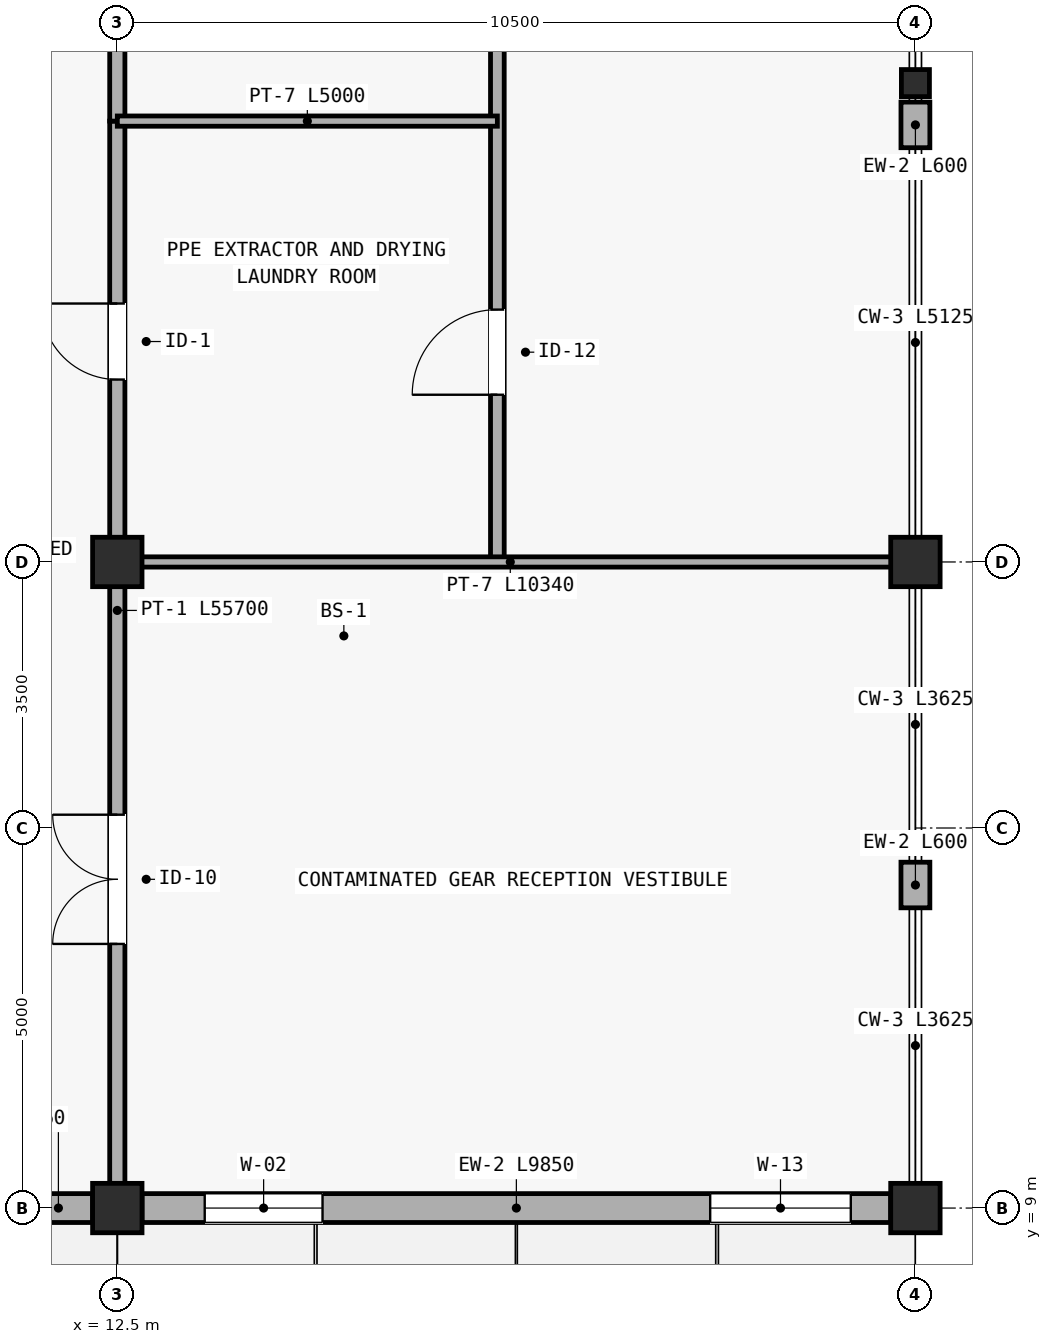
"""IFC4 building model, lengths in metres.
Left out: names, types, materials, properties, quantities, classifications, styles, units other than length and angle.
Written with IfcOpenShell. Run it as: python <this file> out.ifc"""

import sys

from ifc_helpers import new_model, si_unit, direction, frame, frame_2d, origin, origin_2d, place, context, subcontext, project, spatial, rectangle, i_section, extrude, element, fill, save


model = new_model("IFC4")
c1 = context("Model", 3, precision=1e-05, world=origin(), true_north=direction((0.0, 1.0)))
c2 = subcontext(c1, "Body", "Model", "MODEL_VIEW")
j1 = project(units=[si_unit("LENGTHUNIT", "METRE"), si_unit("PLANEANGLEUNIT", "RADIAN")], contexts=[c1])
p1 = place(None, origin())
s1 = spatial("IfcSite", under=j1, at=p1, CompositionType="ELEMENT")
p2 = place(p1, origin())
s2 = spatial("IfcBuilding", under=s1, at=p2, CompositionType="ELEMENT")
p3 = place(p2, origin())
s3 = spatial("IfcBuildingStorey", under=s2, at=p3, CompositionType="ELEMENT", Elevation=0.0)
for number, where, z_axis, x_axis in (
    (1, (12.5, 9.0, 0.0), (0.0, 0.0, 1.0), (1.0, 0.0, 0.0)),
    (2, (12.5, 17.5, 0.0), (0.0, 0.0, 1.0), (1.0, 0.0, 0.0)),
    (3, (23.0, 9.0, 0.0), (0.0, 0.0, 1.0), (1.0, 0.0, 0.0)),
    (4, (23.0, 17.5, 0.0), (0.0, 0.0, 1.0), (1.0, 0.0, 0.0)),
):
    element("IfcColumn", number, at=place(p3, frame(where, z_axis=z_axis, x_axis=x_axis)), inside=s3, PredefinedType="COLUMN", context=c2, shape_type="SweptSolid", body=[
        extrude(rectangle(XDim=0.65, YDim=0.65, at=origin_2d()), origin(), (0.0, 0.0, 1.0), 5.85),
    ])
p4 = place(p3, frame((23.0, 23.8, 0.0), z_axis=(0.0, 0.0, 1.0), x_axis=(1.0, 0.0, 0.0)))
e5 = element("IfcColumn", 5, at=p4, inside=s3, PredefinedType="COLUMN", context=c2, shape_type="SweptSolid", body=[
    extrude(i_section(OverallWidth=0.369, OverallDepth=0.356, WebThickness=0.011, FlangeThickness=0.018, FilletRadius=0.015, at=origin_2d()), origin(), (0.0, 0.0, 1.0), 5.85),
])
p5 = place(p3, frame((8.825, 9.0, 0.0), z_axis=(0.0, 0.0, 1.0), x_axis=(1.0, 0.0, 0.0)))
e6 = element("IfcWall", 6, at=p5, inside=s3, PredefinedType="STANDARD", context=c2, shape_type="SweptSolid", body=[
    extrude(rectangle(XDim=3.35, YDim=0.38, at=frame_2d((1.675, 0.0))), origin(), (0.0, 0.0, 1.0), 5.05),
])
p6 = place(p5, frame((0.625, 0.0, 0.0)))
e7 = element("IfcOpeningElement", 7, at=p6, cuts=e6, PredefinedType="OPENING", context=c2, shape_type="SweptSolid", body=[
    extrude(rectangle(XDim=1.95, YDim=2.3, at=frame_2d((0.975, 1.15))), frame((0.0, 0.2, 0.0), z_axis=(0.0, -1.0, 0.0), x_axis=(1.0, 0.0, 0.0)), (0.0, 0.0, 1.0), 0.4),
])
p7 = place(p3, frame((12.825, 9.0, 0.0), z_axis=(0.0, 0.0, 1.0), x_axis=(1.0, 0.0, 0.0)))
e8 = element("IfcWall", 8, at=p7, inside=s3, PredefinedType="STANDARD", context=c2, shape_type="SweptSolid", body=[
    extrude(rectangle(XDim=9.85, YDim=0.38, at=frame_2d((4.925, 0.0))), origin(), (0.0, 0.0, 1.0), 5.05),
])
p8 = place(p7, frame((0.825, 0.0, 0.75)))
e9 = element("IfcOpeningElement", 9, at=p8, cuts=e8, PredefinedType="OPENING", context=c2, shape_type="SweptSolid", body=[
    extrude(rectangle(XDim=1.55, YDim=1.55, at=frame_2d((0.775, 0.775))), frame((0.0, 0.2, 0.0), z_axis=(0.0, -1.0, 0.0), x_axis=(1.0, 0.0, 0.0)), (0.0, 0.0, 1.0), 0.4),
])
p9 = place(p7, frame((7.475, 0.0, 0.75)))
e10 = element("IfcOpeningElement", 10, at=p9, cuts=e8, PredefinedType="OPENING", context=c2, shape_type="SweptSolid", body=[
    extrude(rectangle(XDim=1.85, YDim=1.3, at=frame_2d((0.925, 0.65))), frame((0.0, 0.2, 0.0), z_axis=(0.0, -1.0, 0.0), x_axis=(1.0, 0.0, 0.0)), (0.0, 0.0, 1.0), 0.4),
])
for number, where, z_axis, x_axis in (
    (11, (23.0, 12.95, 0.0), (0.0, 0.0, 1.0), (0.0, 1.0, 0.0)),
    (12, (23.0, 22.95, 0.0), (0.0, 0.0, 1.0), (0.0, 1.0, 0.0)),
):
    element("IfcWall", number, at=place(p3, frame(where, z_axis=z_axis, x_axis=x_axis)), inside=s3, PredefinedType="STANDARD", context=c2, shape_type="SweptSolid", body=[
        extrude(rectangle(XDim=0.6, YDim=0.38, at=frame_2d((0.3, 0.0))), origin(), (0.0, 0.0, 1.0), 5.05),
    ])
p10 = place(p3, frame((17.5, 17.5, 0.0), z_axis=(0.0, 0.0, 1.0), x_axis=(0.0, 1.0, 0.0)))
e13 = element("IfcWall", 13, at=p10, inside=s3, PredefinedType="PARTITIONING", context=c2, shape_type="SweptSolid", body=[
    extrude(rectangle(XDim=11.5, YDim=0.18, at=frame_2d((5.75, 0.0))), origin(), (0.0, 0.0, 1.0), 5.0),
])
p11 = place(p10, frame((2.2, 0.0, 0.0)))
e14 = element("IfcOpeningElement", 14, at=p11, cuts=e13, PredefinedType="OPENING", context=c2, shape_type="SweptSolid", body=[
    extrude(rectangle(XDim=1.12, YDim=2.15, at=frame_2d((0.56, 1.075))), frame((0.0, 0.1, 0.0), z_axis=(0.0, -1.0, 0.0), x_axis=(1.0, 0.0, 0.0)), (0.0, 0.0, 1.0), 0.2),
])
p12 = place(p3, frame((12.5, 9.15, 0.0), z_axis=(0.0, 0.0, 1.0), x_axis=(0.0, 1.0, 0.0)))
e15 = element("IfcWall", 15, at=p12, inside=s3, PredefinedType="PARTITIONING", context=c2, shape_type="SweptSolid", body=[
    extrude(rectangle(XDim=8.35, YDim=0.2, at=frame_2d((4.175, 0.0))), origin(), (0.0, 0.0, 1.0), 5.0),
])
p13 = place(p12, frame((3.325, 0.0, 0.0)))
e16 = element("IfcOpeningElement", 16, at=p13, cuts=e15, PredefinedType="OPENING", context=c2, shape_type="SweptSolid", body=[
    extrude(rectangle(XDim=1.7, YDim=2.16, at=frame_2d((0.85, 1.08))), frame((0.0, 0.11, 0.0), z_axis=(0.0, -1.0, 0.0), x_axis=(1.0, 0.0, 0.0)), (0.0, 0.0, 1.0), 0.22),
])
p14 = place(p3, frame((12.5, 17.5, 0.0), z_axis=(0.0, 0.0, 1.0), x_axis=(0.0, 1.0, 0.0)))
e17 = element("IfcWall", 17, at=p14, inside=s3, PredefinedType="PARTITIONING", context=c2, shape_type="SweptSolid", body=[
    extrude(rectangle(XDim=5.8, YDim=0.2, at=frame_2d((2.9, 0.0))), origin(), (0.0, 0.0, 1.0), 5.0),
])
p15 = place(p14, frame((2.4, 0.0, 0.0)))
e18 = element("IfcOpeningElement", 18, at=p15, cuts=e17, PredefinedType="OPENING", context=c2, shape_type="SweptSolid", body=[
    extrude(rectangle(XDim=1.0, YDim=2.12, at=frame_2d((0.5, 1.06))), frame((0.0, 0.11, 0.0), z_axis=(0.0, -1.0, 0.0), x_axis=(1.0, 0.0, 0.0)), (0.0, 0.0, 1.0), 0.22),
])
p16 = place(p3, frame((12.5, 23.3, 0.0), z_axis=(0.0, 0.0, 1.0), x_axis=(0.0, 1.0, 0.0)))
e19 = element("IfcWall", 19, at=p16, inside=s3, PredefinedType="PARTITIONING", context=c2, shape_type="SweptSolid", body=[
    extrude(rectangle(XDim=5.7, YDim=0.2, at=frame_2d((2.85, 0.0))), origin(), (0.0, 0.0, 1.0), 5.0),
])
p17 = place(p16, frame((2.36, 0.0, 0.0)))
e20 = element("IfcOpeningElement", 20, at=p17, cuts=e19, PredefinedType="OPENING", context=c2, shape_type="SweptSolid", body=[
    extrude(rectangle(XDim=0.98, YDim=2.12, at=frame_2d((0.49, 1.06))), frame((0.0, 0.11, 0.0), z_axis=(0.0, -1.0, 0.0), x_axis=(1.0, 0.0, 0.0)), (0.0, 0.0, 1.0), 0.22),
])
p18 = place(p3, frame((12.5, 17.5, 0.0), z_axis=(0.0, 0.0, 1.0), x_axis=(1.0, 0.0, 0.0)))
e21 = element("IfcWall", 21, at=p18, inside=s3, PredefinedType="PARTITIONING", context=c2, shape_type="SweptSolid", body=[
    extrude(rectangle(XDim=10.34, YDim=0.135, at=frame_2d((5.17, 0.0))), origin(), (0.0, 0.0, 1.0), 5.0),
])
p19 = place(p3, frame((12.5, 23.3, 0.0), z_axis=(0.0, 0.0, 1.0), x_axis=(1.0, 0.0, 0.0)))
e22 = element("IfcWall", 22, at=p19, inside=s3, PredefinedType="PARTITIONING", context=c2, shape_type="SweptSolid", body=[
    extrude(rectangle(XDim=5.0, YDim=0.135, at=frame_2d((2.5, 0.0))), origin(), (0.0, 0.0, 1.0), 5.0),
])
p20 = place(p8, origin())
e23 = element("IfcWindow", 23, at=p20, inside=s3, PartitioningType="DOUBLE_PANEL_VERTICAL", PredefinedType="WINDOW", context=c2, shape_type="SweptSolid", body=[
    extrude(rectangle(XDim=1.55, YDim=1.55, at=frame_2d((0.775, 0.775))), frame((0.0, 0.03, 0.0), z_axis=(0.0, -1.0, 0.0), x_axis=(1.0, 0.0, 0.0)), (0.0, 0.0, 1.0), 0.06),
])
fill(e9, e23)
p21 = place(p9, origin())
e24 = element("IfcWindow", 24, at=p21, inside=s3, PartitioningType="DOUBLE_PANEL_HORIZONTAL", PredefinedType="WINDOW", context=c2, shape_type="SweptSolid", body=[
    extrude(rectangle(XDim=1.85, YDim=1.3, at=frame_2d((0.925, 0.65))), frame((0.0, 0.03, 0.0), z_axis=(0.0, -1.0, 0.0), x_axis=(1.0, 0.0, 0.0)), (0.0, 0.0, 1.0), 0.06),
])
fill(e10, e24)
p22 = place(p11, origin())
e25 = element("IfcDoor", 25, at=p22, inside=s3, OperationType="SINGLE_SWING_LEFT", PredefinedType="DOOR", context=c2, shape_type="SweptSolid", body=[
    extrude(rectangle(XDim=1.12, YDim=2.15, at=frame_2d((0.56, 1.075))), frame((0.0, 0.025, 0.0), z_axis=(0.0, -1.0, 0.0), x_axis=(1.0, 0.0, 0.0)), (0.0, 0.0, 1.0), 0.05),
])
fill(e14, e25)
p23 = place(p13, origin())
e26 = element("IfcDoor", 26, at=p23, inside=s3, OperationType="DOUBLE_DOOR_SINGLE_SWING", PredefinedType="DOOR", context=c2, shape_type="SweptSolid", body=[
    extrude(rectangle(XDim=1.7, YDim=2.16, at=frame_2d((0.85, 1.08))), frame((0.0, 0.025, 0.0), z_axis=(0.0, -1.0, 0.0), x_axis=(1.0, 0.0, 0.0)), (0.0, 0.0, 1.0), 0.05),
])
fill(e16, e26)
p24 = place(p15, origin())
e27 = element("IfcDoor", 27, at=p24, inside=s3, OperationType="SINGLE_SWING_RIGHT", PredefinedType="DOOR", context=c2, shape_type="SweptSolid", body=[
    extrude(rectangle(XDim=1.0, YDim=2.12, at=frame_2d((0.5, 1.06))), frame((0.0, 0.025, 0.0), z_axis=(0.0, -1.0, 0.0), x_axis=(1.0, 0.0, 0.0)), (0.0, 0.0, 1.0), 0.05),
])
fill(e18, e27)
save(model, sys.argv[1])
